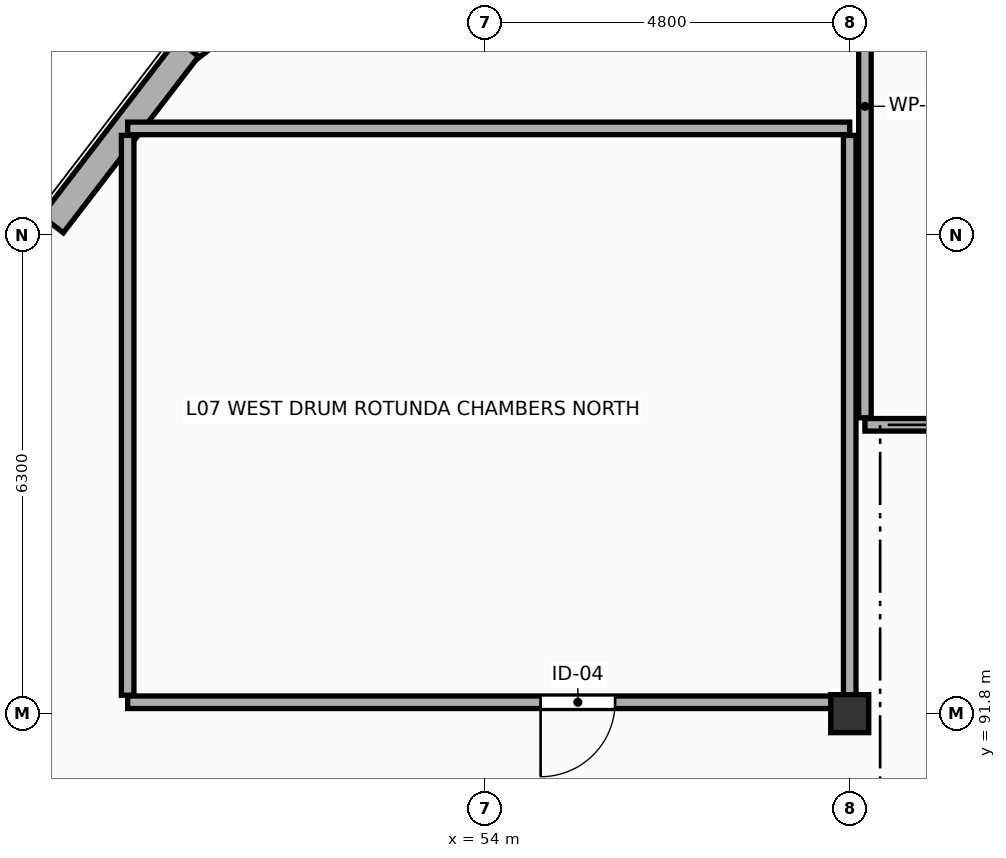
"""IFC4 building model, lengths in metres.
Left out: names, types, materials, properties, quantities, classifications, styles, units other than length and angle.
Written with IfcOpenShell. Run it as: python <this file> out.ifc"""

import sys

from ifc_helpers import new_model, si_unit, direction, frame, frame_2d, origin, origin_2d, place, context, subcontext, project, spatial, rectangle, extrude, element, fill, save


model = new_model("IFC4")
c1 = context("Model", 3, precision=1e-05, world=origin(), true_north=direction((0.0, 1.0)))
c2 = subcontext(c1, "Body", "Model", "MODEL_VIEW")
j1 = project(units=[si_unit("LENGTHUNIT", "METRE"), si_unit("PLANEANGLEUNIT", "RADIAN")], contexts=[c1])
p1 = place(None, origin())
s1 = spatial("IfcSite", under=j1, at=p1, CompositionType="ELEMENT")
p2 = place(p1, origin())
s2 = spatial("IfcBuilding", under=s1, at=p2, CompositionType="ELEMENT")
p3 = place(p2, frame((0.0, 0.0, 27.0)))
s3 = spatial("IfcBuildingStorey", under=s2, at=p3, CompositionType="ELEMENT", Elevation=27.0)
p4 = place(p3, frame((58.8, 91.8, 0.0), z_axis=(0.0, 0.0, 1.0), x_axis=(1.0, 0.0, 0.0)))
e1 = element("IfcColumn", 1, at=p4, inside=s3, PredefinedType="COLUMN", context=c2, shape_type="SweptSolid", body=[
    extrude(rectangle(XDim=0.5, YDim=0.5, at=origin_2d()), origin(), (0.0, 0.0, 1.0), 4.2),
])
p5 = place(p3, frame((52.363, 102.292, 0.0), z_axis=(0.0, 0.0, 1.0), x_axis=(-0.793318703663, -0.608806565682, 0.0)))
e2 = element("IfcWall", 2, at=p5, inside=s3, PredefinedType="ELEMENTEDWALL", context=c2, shape_type="SweptSolid", body=[
    extrude(rectangle(XDim=2.924, YDim=0.365, at=frame_2d((1.462, 0.0))), origin(), (0.0, 0.0, 1.0), 3.01),
])
p6 = place(p5, frame((1.062, 0.0, 0.85)))
e3 = element("IfcOpeningElement", 3, at=p6, cuts=e2, PredefinedType="OPENING", context=c2, shape_type="SweptSolid", body=[
    extrude(rectangle(XDim=0.8, YDim=1.7, at=frame_2d((0.4, 0.85))), frame((0.0, 0.192, 0.0), z_axis=(0.0, -1.0, 0.0), x_axis=(1.0, 0.0, 0.0)), (0.0, 0.0, 1.0), 0.385),
])
p7 = place(p3, frame((50.089, 100.557, 0.0), z_axis=(0.0, 0.0, 1.0), x_axis=(-0.60876624393, -0.793349645649, 0.0)))
e4 = element("IfcWall", 4, at=p7, inside=s3, PredefinedType="ELEMENTEDWALL", context=c2, shape_type="SweptSolid", body=[
    extrude(rectangle(XDim=2.924, YDim=0.365, at=frame_2d((1.462, 0.0))), origin(), (0.0, 0.0, 1.0), 3.11),
])
p8 = place(p3, frame((72.4, 95.6, 0.0), z_axis=(0.0, 0.0, 1.0), x_axis=(-1.0, 0.0, 0.0)))
e5 = element("IfcWall", 5, at=p8, inside=s3, PredefinedType="PARTITIONING", context=c2, shape_type="SweptSolid", body=[
    extrude(rectangle(XDim=13.4, YDim=0.165, at=frame_2d((6.7, 0.0))), origin(), (0.0, 0.0, 1.0), 3.11),
])
p9 = place(p3, frame((59.0, 95.692, 0.0), z_axis=(0.0, 0.0, 1.0), x_axis=(0.0, 1.0, 0.0)))
e6 = element("IfcWall", 6, at=p9, inside=s3, PredefinedType="PARTITIONING", context=c2, shape_type="SweptSolid", body=[
    extrude(rectangle(XDim=8.304, YDim=0.165, at=frame_2d((4.152, 0.0))), origin(), (0.0, 0.0, 1.0), 3.11),
])
p10 = place(p3, frame((49.3, 99.5, 0.0), z_axis=(0.0, 0.0, 1.0), x_axis=(1.0, 0.0, 0.0)))
e7 = element("IfcWall", 7, at=p10, inside=s3, PredefinedType="PARTITIONING", context=c2, shape_type="SweptSolid", body=[
    extrude(rectangle(XDim=9.5, YDim=0.165, at=frame_2d((4.75, 0.0))), origin(), (0.0, 0.0, 1.0), 3.01),
])
p11 = place(p3, frame((58.8, 91.95, 0.0), z_axis=(0.0, 0.0, 1.0), x_axis=(-1.0, 0.0, 0.0)))
e8 = element("IfcWall", 8, at=p11, inside=s3, PredefinedType="PARTITIONING", context=c2, shape_type="SweptSolid", body=[
    extrude(rectangle(XDim=9.5, YDim=0.165, at=frame_2d((4.75, 0.0))), origin(), (0.0, 0.0, 1.0), 3.01),
])
p12 = place(p11, frame((3.087, 0.0, 0.0)))
e9 = element("IfcOpeningElement", 9, at=p12, cuts=e8, PredefinedType="OPENING", context=c2, shape_type="SweptSolid", body=[
    extrude(rectangle(XDim=0.98, YDim=2.2, at=frame_2d((0.49, 1.1))), frame((0.0, 0.093, 0.0), z_axis=(0.0, -1.0, 0.0), x_axis=(1.0, 0.0, 0.0)), (0.0, 0.0, 1.0), 0.185),
])
p13 = place(p3, frame((49.3, 92.042, 0.0), z_axis=(0.0, 0.0, 1.0), x_axis=(0.0, 1.0, 0.0)))
e10 = element("IfcWall", 10, at=p13, inside=s3, PredefinedType="PARTITIONING", context=c2, shape_type="SweptSolid", body=[
    extrude(rectangle(XDim=7.365, YDim=0.165, at=frame_2d((3.683, 0.0))), origin(), (0.0, 0.0, 1.0), 3.61),
])
p14 = place(p3, frame((58.8, 99.407, 0.0), z_axis=(0.0, 0.0, 1.0), x_axis=(0.0, -1.0, 0.0)))
e11 = element("IfcWall", 11, at=p14, inside=s3, PredefinedType="PARTITIONING", context=c2, shape_type="SweptSolid", body=[
    extrude(rectangle(XDim=7.365, YDim=0.165, at=frame_2d((3.683, 0.0))), origin(), (0.0, 0.0, 1.0), 3.11),
])
p15 = place(p12, origin())
e12 = element("IfcDoor", 12, at=p15, inside=s3, OperationType="SINGLE_SWING_RIGHT", PredefinedType="DOOR", context=c2, shape_type="SweptSolid", body=[
    extrude(rectangle(XDim=0.98, YDim=2.2, at=frame_2d((0.49, 1.1))), frame((0.0, 0.025, 0.0), z_axis=(0.0, -1.0, 0.0), x_axis=(1.0, 0.0, 0.0)), (0.0, 0.0, 1.0), 0.05),
])
fill(e9, e12)
save(model, sys.argv[1])
